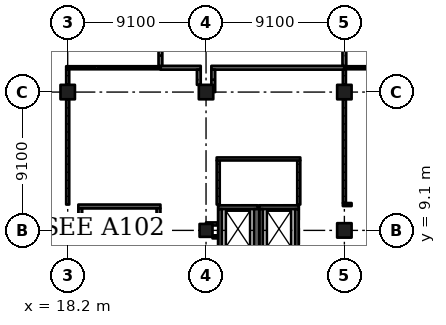
"""IFC4 building model, lengths in metres.
Left out: names, types, materials, properties, quantities, classifications, styles, units other than length and angle.
Written with IfcOpenShell. Run it as: python <this file> out.ifc"""

import sys

from ifc_helpers import new_model, si_unit, direction, frame, frame_2d, origin, origin_2d, place, context, subcontext, project, spatial, rectangle, extrude, element, fill, save


model = new_model("IFC4")
c1 = context("Model", 3, precision=1e-05, world=origin(), true_north=direction((0.0, 1.0)))
c2 = subcontext(c1, "Body", "Model", "MODEL_VIEW")
j1 = project(units=[si_unit("LENGTHUNIT", "METRE"), si_unit("PLANEANGLEUNIT", "RADIAN")], contexts=[c1])
p1 = place(None, origin())
s1 = spatial("IfcSite", under=j1, at=p1, CompositionType="ELEMENT")
p2 = place(p1, origin())
s2 = spatial("IfcBuilding", under=s1, at=p2, CompositionType="ELEMENT")
p3 = place(p2, origin())
s3 = spatial("IfcBuildingStorey", under=s2, at=p3, CompositionType="ELEMENT", Elevation=0.0)
p4 = place(p3, frame((18.2, 9.1, -0.4), z_axis=(0.0, 0.0, 1.0), x_axis=(1.0, 0.0, 0.0)))
e1 = element("IfcColumn", 1, at=p4, inside=s3, PredefinedType="COLUMN", context=c2, shape_type="SweptSolid", body=[
    extrude(rectangle(XDim=0.8, YDim=0.8, at=origin_2d()), origin(), (0.0, 0.0, 1.0), 6.77),
])
p5 = place(p3, frame((18.2, 18.2, -0.4), z_axis=(0.0, 0.0, 1.0), x_axis=(1.0, 0.0, 0.0)))
e2 = element("IfcColumn", 2, at=p5, inside=s3, PredefinedType="COLUMN", context=c2, shape_type="SweptSolid", body=[
    extrude(rectangle(XDim=0.95, YDim=0.95, at=origin_2d()), origin(), (0.0, 0.0, 1.0), 6.77),
])
p6 = place(p3, frame((27.3, 9.1, -0.4), z_axis=(0.0, 0.0, 1.0), x_axis=(1.0, 0.0, 0.0)))
e3 = element("IfcColumn", 3, at=p6, inside=s3, PredefinedType="COLUMN", context=c2, shape_type="SweptSolid", body=[
    extrude(rectangle(XDim=0.85, YDim=0.85, at=origin_2d()), origin(), (0.0, 0.0, 1.0), 6.77),
])
for number, where, z_axis, x_axis in (
    (4, (27.3, 18.2, -0.4), (0.0, 0.0, 1.0), (1.0, 0.0, 0.0)),
    (5, (36.4, 9.1, -0.4), (0.0, 0.0, 1.0), (1.0, 0.0, 0.0)),
    (6, (36.4, 18.2, -0.4), (0.0, 0.0, 1.0), (1.0, 0.0, 0.0)),
):
    element("IfcColumn", number, at=place(p3, frame(where, z_axis=z_axis, x_axis=x_axis)), inside=s3, PredefinedType="COLUMN", context=c2, shape_type="SweptSolid", body=[
        extrude(rectangle(XDim=0.95, YDim=0.95, at=origin_2d()), origin(), (0.0, 0.0, 1.0), 6.77),
    ])
p7 = place(p3, frame((30.7, 10.625, -1.4), z_axis=(0.0, 0.0, 1.0), x_axis=(-1.0, 0.0, 0.0)))
e7 = element("IfcWall", 7, at=p7, inside=s3, PredefinedType="SHEAR", context=c2, shape_type="SweptSolid", body=[
    extrude(rectangle(XDim=2.6, YDim=0.25, at=frame_2d((1.3, 0.0))), origin(), (0.0, 0.0, 1.0), 7.77),
])
p8 = place(p7, frame((0.8, 0.0, 1.4)))
e8 = element("IfcOpeningElement", 8, at=p8, cuts=e7, PredefinedType="OPENING", context=c2, shape_type="SweptSolid", body=[
    extrude(rectangle(XDim=1.0, YDim=2.1, at=frame_2d((0.5, 1.05))), frame((0.0, 0.135, 0.0), z_axis=(0.0, -1.0, 0.0), x_axis=(1.0, 0.0, 0.0)), (0.0, 0.0, 1.0), 0.27),
])
p9 = place(p3, frame((28.225, 10.5, -1.4), z_axis=(0.0, 0.0, 1.0), x_axis=(0.0, -1.0, 0.0)))
e9 = element("IfcWall", 9, at=p9, inside=s3, PredefinedType="SHEAR", context=c2, shape_type="SweptSolid", body=[
    extrude(rectangle(XDim=2.9, YDim=0.25, at=frame_2d((1.45, 0.0))), origin(), (0.0, 0.0, 1.0), 7.77),
])
p10 = place(p3, frame((30.625, 10.5, -1.4), z_axis=(0.0, 0.0, 1.0), x_axis=(0.0, -1.0, 0.0)))
e10 = element("IfcWall", 10, at=p10, inside=s3, PredefinedType="SHEAR", context=c2, shape_type="SweptSolid", body=[
    extrude(rectangle(XDim=2.9, YDim=0.35, at=frame_2d((1.45, 0.0))), origin(), (0.0, 0.0, 1.0), 7.77),
])
p11 = place(p3, frame((33.4, 10.625, -1.4), z_axis=(0.0, 0.0, 1.0), x_axis=(-1.0, 0.0, 0.0)))
e11 = element("IfcWall", 11, at=p11, inside=s3, PredefinedType="SHEAR", context=c2, shape_type="SweptSolid", body=[
    extrude(rectangle(XDim=2.6, YDim=0.25, at=frame_2d((1.3, 0.0))), origin(), (0.0, 0.0, 1.0), 7.77),
])
p12 = place(p11, frame((0.8, 0.0, 1.4)))
e12 = element("IfcOpeningElement", 12, at=p12, cuts=e11, PredefinedType="OPENING", context=c2, shape_type="SweptSolid", body=[
    extrude(rectangle(XDim=1.0, YDim=2.1, at=frame_2d((0.5, 1.05))), frame((0.0, 0.135, 0.0), z_axis=(0.0, -1.0, 0.0), x_axis=(1.0, 0.0, 0.0)), (0.0, 0.0, 1.0), 0.27),
])
for number, where, z_axis, x_axis in (
    (13, (30.925, 10.5, -1.4), (0.0, 0.0, 1.0), (0.0, -1.0, 0.0)),
    (14, (33.275, 10.5, -1.4), (0.0, 0.0, 1.0), (0.0, -1.0, 0.0)),
):
    element("IfcWall", number, at=place(p3, frame(where, z_axis=z_axis, x_axis=x_axis)), inside=s3, PredefinedType="SHEAR", context=c2, shape_type="SweptSolid", body=[
        extrude(rectangle(XDim=2.9, YDim=0.25, at=frame_2d((1.45, 0.0))), origin(), (0.0, 0.0, 1.0), 7.77),
    ])
p13 = place(p3, frame((24.3, 10.675, -0.4), z_axis=(0.0, 0.0, 1.0), x_axis=(-1.0, 0.0, 0.0)))
e15 = element("IfcWall", 15, at=p13, inside=s3, PredefinedType="SHEAR", context=c2, shape_type="SweptSolid", body=[
    extrude(rectangle(XDim=5.4, YDim=0.25, at=frame_2d((2.7, 0.0))), origin(), (0.0, 0.0, 1.0), 6.77),
])
p14 = place(p13, frame((1.5, 0.0, 0.4)))
e16 = element("IfcOpeningElement", 16, at=p14, cuts=e15, PredefinedType="OPENING", context=c2, shape_type="SweptSolid", body=[
    extrude(rectangle(XDim=2.4, YDim=2.1, at=frame_2d((1.2, 1.05))), frame((0.0, 0.135, 0.0), z_axis=(0.0, -1.0, 0.0), x_axis=(1.0, 0.0, 0.0)), (0.0, 0.0, 1.0), 0.27),
])
p15 = place(p3, frame((19.025, 10.55, -0.4), z_axis=(0.0, 0.0, 1.0), x_axis=(0.0, -1.0, 0.0)))
e17 = element("IfcWall", 17, at=p15, inside=s3, PredefinedType="SHEAR", context=c2, shape_type="SweptSolid", body=[
    extrude(rectangle(XDim=9.6, YDim=0.25, at=frame_2d((4.8, 0.0))), origin(), (0.0, 0.0, 1.0), 6.77),
])
p16 = place(p3, frame((24.175, 10.55, -0.4), z_axis=(0.0, 0.0, 1.0), x_axis=(0.0, -1.0, 0.0)))
e18 = element("IfcWall", 18, at=p16, inside=s3, PredefinedType="SHEAR", context=c2, shape_type="SweptSolid", body=[
    extrude(rectangle(XDim=9.6, YDim=0.25, at=frame_2d((4.8, 0.0))), origin(), (0.0, 0.0, 1.0), 6.77),
])
p17 = place(p16, frame((0.45, 0.0, 0.4)))
e19 = element("IfcOpeningElement", 19, at=p17, cuts=e18, PredefinedType="OPENING", context=c2, shape_type="SweptSolid", body=[
    extrude(rectangle(XDim=1.2, YDim=2.1, at=frame_2d((0.6, 1.05))), frame((0.0, 0.135, 0.0), z_axis=(0.0, -1.0, 0.0), x_axis=(1.0, 0.0, 0.0)), (0.0, 0.0, 1.0), 0.27),
])
p18 = place(p3, frame((18.1, 19.8, 0.0), z_axis=(0.0, 0.0, 1.0), x_axis=(1.0, 0.0, 0.0)))
e20 = element("IfcWall", 20, at=p18, inside=s3, PredefinedType="PARTITIONING", context=c2, shape_type="SweptSolid", body=[
    extrude(rectangle(XDim=6.2, YDim=0.2, at=frame_2d((3.1, 0.0))), origin(), (0.0, 0.0, 1.0), 6.02),
])
p19 = place(p18, frame((2.95, 0.0, 0.0)))
e21 = element("IfcOpeningElement", 21, at=p19, cuts=e20, PredefinedType="OPENING", context=c2, shape_type="SweptSolid", body=[
    extrude(rectangle(XDim=1.8, YDim=2.4, at=frame_2d((0.9, 1.2))), frame((0.0, 0.11, 0.0), z_axis=(0.0, -1.0, 0.0), x_axis=(1.0, 0.0, 0.0)), (0.0, 0.0, 1.0), 0.22),
])
p20 = place(p3, frame((18.2, 17.725, 0.0), z_axis=(0.0, 0.0, 1.0), x_axis=(0.0, -1.0, 0.0)))
e22 = element("IfcWall", 22, at=p20, inside=s3, PredefinedType="PARTITIONING", context=c2, shape_type="SweptSolid", body=[
    extrude(rectangle(XDim=6.925, YDim=0.2, at=frame_2d((3.462, 0.0))), origin(), (0.0, 0.0, 1.0), 5.32),
])
p21 = place(p20, frame((0.85, 0.0, 0.0)))
e23 = element("IfcOpeningElement", 23, at=p21, cuts=e22, PredefinedType="OPENING", context=c2, shape_type="SweptSolid", body=[
    extrude(rectangle(XDim=1.8, YDim=2.4, at=frame_2d((0.9, 1.2))), frame((0.0, 0.11, 0.0), z_axis=(0.0, -1.0, 0.0), x_axis=(1.0, 0.0, 0.0)), (0.0, 0.0, 1.0), 0.22),
])
p22 = place(p20, frame((4.25, 0.0, 0.0)))
e24 = element("IfcOpeningElement", 24, at=p22, cuts=e22, PredefinedType="OPENING", context=c2, shape_type="SweptSolid", body=[
    extrude(rectangle(XDim=1.8, YDim=2.4, at=frame_2d((0.9, 1.2))), frame((0.0, 0.11, 0.0), z_axis=(0.0, -1.0, 0.0), x_axis=(1.0, 0.0, 0.0)), (0.0, 0.0, 1.0), 0.22),
])
p23 = place(p3, frame((18.2, 19.7, 0.0), z_axis=(0.0, 0.0, 1.0), x_axis=(0.0, -1.0, 0.0)))
e25 = element("IfcWall", 25, at=p23, inside=s3, PredefinedType="PARTITIONING", context=c2, shape_type="SweptSolid", body=[
    extrude(rectangle(XDim=1.025, YDim=0.2, at=frame_2d((0.512, 0.0))), origin(), (0.0, 0.0, 1.0), 5.32),
])
p24 = place(p3, frame((24.3, 19.8, 0.0), z_axis=(0.0, 0.0, 1.0), x_axis=(1.0, 0.0, 0.0)))
e26 = element("IfcWall", 26, at=p24, inside=s3, PredefinedType="SOLIDWALL", context=c2, shape_type="SweptSolid", body=[
    extrude(rectangle(XDim=2.65, YDim=0.25, at=frame_2d((1.325, 0.0))), origin(), (0.0, 0.0, 1.0), 6.02),
])
p25 = place(p3, frame((24.3, 22.8, 0.0), z_axis=(0.0, 0.0, 1.0), x_axis=(0.0, -1.0, 0.0)))
e27 = element("IfcWall", 27, at=p25, inside=s3, PredefinedType="SOLIDWALL", context=c2, shape_type="SweptSolid", body=[
    extrude(rectangle(XDim=2.875, YDim=0.25, at=frame_2d((1.438, 0.0))), origin(), (0.0, 0.0, 1.0), 6.02),
])
p26 = place(p3, frame((26.825, 19.675, 0.0), z_axis=(0.0, 0.0, 1.0), x_axis=(0.0, -1.0, 0.0)))
e28 = element("IfcWall", 28, at=p26, inside=s3, PredefinedType="SOLIDWALL", context=c2, shape_type="SweptSolid", body=[
    extrude(rectangle(XDim=1.0, YDim=0.25, at=frame_2d((0.5, 0.0))), origin(), (0.0, 0.0, 1.0), 6.02),
])
p27 = place(p3, frame((27.3, 9.525, 0.0), z_axis=(0.0, 0.0, 1.0), x_axis=(1.0, 0.0, 0.0)))
e29 = element("IfcWall", 29, at=p27, inside=s3, PredefinedType="PARTITIONING", context=c2, shape_type="SweptSolid", body=[
    extrude(rectangle(XDim=0.77, YDim=0.2, at=frame_2d((0.385, 0.0))), origin(), (0.0, 0.0, 1.0), 6.02),
])
p28 = place(p3, frame((27.65, 19.8, 0.0), z_axis=(0.0, 0.0, 1.0), x_axis=(1.0, 0.0, 0.0)))
e30 = element("IfcWall", 30, at=p28, inside=s3, PredefinedType="SOLIDWALL", context=c2, shape_type="SweptSolid", body=[
    extrude(rectangle(XDim=8.75, YDim=0.25, at=frame_2d((4.375, 0.0))), origin(), (0.0, 0.0, 1.0), 6.02),
])
p29 = place(p28, frame((3.45, 0.0, 0.0)))
e31 = element("IfcOpeningElement", 31, at=p29, cuts=e30, PredefinedType="OPENING", context=c2, shape_type="SweptSolid", body=[
    extrude(rectangle(XDim=1.8, YDim=2.1, at=frame_2d((0.9, 1.05))), frame((0.0, 0.135, 0.0), z_axis=(0.0, -1.0, 0.0), x_axis=(1.0, 0.0, 0.0)), (0.0, 0.0, 1.0), 0.27),
])
p30 = place(p3, frame((27.725, 8.675, 0.0), z_axis=(0.0, 0.0, 1.0), x_axis=(1.0, 0.0, 0.0)))
e32 = element("IfcWall", 32, at=p30, inside=s3, PredefinedType="PARTITIONING", context=c2, shape_type="SweptSolid", body=[
    extrude(rectangle(XDim=0.345, YDim=0.2, at=frame_2d((0.172, 0.0))), origin(), (0.0, 0.0, 1.0), 6.02),
])
p31 = place(p3, frame((27.775, 18.2, 0.0), z_axis=(0.0, 0.0, 1.0), x_axis=(0.0, 1.0, 0.0)))
e33 = element("IfcWall", 33, at=p31, inside=s3, PredefinedType="SOLIDWALL", context=c2, shape_type="SweptSolid", body=[
    extrude(rectangle(XDim=1.475, YDim=0.25, at=frame_2d((0.738, 0.0))), origin(), (0.0, 0.0, 1.0), 6.02),
])
p32 = place(p3, frame((28.1, 13.7, 0.0), z_axis=(0.0, 0.0, 1.0), x_axis=(0.0, -1.0, 0.0)))
e34 = element("IfcWall", 34, at=p32, inside=s3, PredefinedType="PARTITIONING", context=c2, shape_type="SweptSolid", body=[
    extrude(rectangle(XDim=2.9, YDim=0.2, at=frame_2d((1.45, 0.0))), origin(), (0.0, 0.0, 1.0), 6.02),
])
p33 = place(p32, frame((0.55, 0.0, 0.0)))
e35 = element("IfcOpeningElement", 35, at=p33, cuts=e34, PredefinedType="OPENING", context=c2, shape_type="SweptSolid", body=[
    extrude(rectangle(XDim=1.8, YDim=2.4, at=frame_2d((0.9, 1.2))), frame((0.0, 0.11, 0.0), z_axis=(0.0, -1.0, 0.0), x_axis=(1.0, 0.0, 0.0)), (0.0, 0.0, 1.0), 0.22),
])
p34 = place(p3, frame((33.4, 10.8, 0.0), z_axis=(0.0, 0.0, 1.0), x_axis=(0.0, 1.0, 0.0)))
e36 = element("IfcWall", 36, at=p34, inside=s3, PredefinedType="PARTITIONING", context=c2, shape_type="SweptSolid", body=[
    extrude(rectangle(XDim=2.9, YDim=0.2, at=frame_2d((1.45, 0.0))), origin(), (0.0, 0.0, 1.0), 6.02),
])
p35 = place(p34, frame((0.55, 0.0, 0.0)))
e37 = element("IfcOpeningElement", 37, at=p35, cuts=e36, PredefinedType="OPENING", context=c2, shape_type="SweptSolid", body=[
    extrude(rectangle(XDim=1.8, YDim=2.4, at=frame_2d((0.9, 1.2))), frame((0.0, 0.11, 0.0), z_axis=(0.0, -1.0, 0.0), x_axis=(1.0, 0.0, 0.0)), (0.0, 0.0, 1.0), 0.22),
])
p36 = place(p3, frame((33.5, 13.8, 0.0), z_axis=(0.0, 0.0, 1.0), x_axis=(-1.0, 0.0, 0.0)))
e38 = element("IfcWall", 38, at=p36, inside=s3, PredefinedType="PARTITIONING", context=c2, shape_type="SweptSolid", body=[
    extrude(rectangle(XDim=5.5, YDim=0.2, at=frame_2d((2.75, 0.0))), origin(), (0.0, 0.0, 1.0), 6.02),
])
p37 = place(p36, frame((1.85, 0.0, 0.0)))
e39 = element("IfcOpeningElement", 39, at=p37, cuts=e38, PredefinedType="OPENING", context=c2, shape_type="SweptSolid", body=[
    extrude(rectangle(XDim=1.8, YDim=2.4, at=frame_2d((0.9, 1.2))), frame((0.0, 0.11, 0.0), z_axis=(0.0, -1.0, 0.0), x_axis=(1.0, 0.0, 0.0)), (0.0, 0.0, 1.0), 0.22),
])
p38 = place(p3, frame((36.3, 10.8, 0.0), z_axis=(0.0, 0.0, 1.0), x_axis=(1.0, 0.0, 0.0)))
e40 = element("IfcWall", 40, at=p38, inside=s3, PredefinedType="PARTITIONING", context=c2, shape_type="SweptSolid", body=[
    extrude(rectangle(XDim=0.575, YDim=0.2, at=frame_2d((0.288, 0.0))), origin(), (0.0, 0.0, 1.0), 6.02),
])
p39 = place(p3, frame((36.4, 17.725, 0.0), z_axis=(0.0, 0.0, 1.0), x_axis=(0.0, -1.0, 0.0)))
e41 = element("IfcWall", 41, at=p39, inside=s3, PredefinedType="PARTITIONING", context=c2, shape_type="SweptSolid", body=[
    extrude(rectangle(XDim=6.825, YDim=0.2, at=frame_2d((3.413, 0.0))), origin(), (0.0, 0.0, 1.0), 5.32),
])
p40 = place(p39, frame((0.85, 0.0, 0.0)))
e42 = element("IfcOpeningElement", 42, at=p40, cuts=e41, PredefinedType="OPENING", context=c2, shape_type="SweptSolid", body=[
    extrude(rectangle(XDim=1.8, YDim=2.4, at=frame_2d((0.9, 1.2))), frame((0.0, 0.11, 0.0), z_axis=(0.0, -1.0, 0.0), x_axis=(1.0, 0.0, 0.0)), (0.0, 0.0, 1.0), 0.22),
])
p41 = place(p39, frame((4.25, 0.0, 0.0)))
e43 = element("IfcOpeningElement", 43, at=p41, cuts=e41, PredefinedType="OPENING", context=c2, shape_type="SweptSolid", body=[
    extrude(rectangle(XDim=1.8, YDim=2.4, at=frame_2d((0.9, 1.2))), frame((0.0, 0.11, 0.0), z_axis=(0.0, -1.0, 0.0), x_axis=(1.0, 0.0, 0.0)), (0.0, 0.0, 1.0), 0.22),
])
p42 = place(p3, frame((36.4, 19.675, 0.0), z_axis=(0.0, 0.0, 1.0), x_axis=(0.0, -1.0, 0.0)))
e44 = element("IfcWall", 44, at=p42, inside=s3, PredefinedType="PARTITIONING", context=c2, shape_type="SweptSolid", body=[
    extrude(rectangle(XDim=1.0, YDim=0.2, at=frame_2d((0.5, 0.0))), origin(), (0.0, 0.0, 1.0), 5.32),
])
p43 = place(p3, frame((36.4, 19.8, 0.0), z_axis=(0.0, 0.0, 1.0), x_axis=(1.0, 0.0, 0.0)))
e45 = element("IfcWall", 45, at=p43, inside=s3, PredefinedType="PARTITIONING", context=c2, shape_type="SweptSolid", body=[
    extrude(rectangle(XDim=4.15, YDim=0.2, at=frame_2d((2.075, 0.0))), origin(), (0.0, 0.0, 1.0), 6.02),
])
p44 = place(p43, frame((1.15, 0.0, 0.0)))
e46 = element("IfcOpeningElement", 46, at=p44, cuts=e45, PredefinedType="OPENING", context=c2, shape_type="SweptSolid", body=[
    extrude(rectangle(XDim=1.8, YDim=2.4, at=frame_2d((0.9, 1.2))), frame((0.0, 0.11, 0.0), z_axis=(0.0, -1.0, 0.0), x_axis=(1.0, 0.0, 0.0)), (0.0, 0.0, 1.0), 0.22),
])
p45 = place(p3, frame((36.4, 26.85, 0.0), z_axis=(0.0, 0.0, 1.0), x_axis=(0.0, -1.0, 0.0)))
e47 = element("IfcWall", 47, at=p45, inside=s3, PredefinedType="SOLIDWALL", context=c2, shape_type="SweptSolid", body=[
    extrude(rectangle(XDim=6.925, YDim=0.25, at=frame_2d((3.462, 0.0))), origin(), (0.0, 0.0, 1.0), 5.32),
])
p46 = place(p29, origin())
e48 = element("IfcDoor", 48, at=p46, inside=s3, OperationType="DOUBLE_DOOR_SINGLE_SWING", PredefinedType="DOOR", context=c2, shape_type="SweptSolid", body=[
    extrude(rectangle(XDim=1.8, YDim=2.1, at=frame_2d((0.9, 1.05))), frame((0.0, 0.025, 0.0), z_axis=(0.0, -1.0, 0.0), x_axis=(1.0, 0.0, 0.0)), (0.0, 0.0, 1.0), 0.05),
])
fill(e31, e48)
p47 = place(p21, origin())
e49 = element("IfcDoor", 49, at=p47, inside=s3, OperationType="DOUBLE_DOOR_SINGLE_SWING", PredefinedType="DOOR", context=c2, shape_type="SweptSolid", body=[
    extrude(rectangle(XDim=1.8, YDim=2.4, at=frame_2d((0.9, 1.2))), frame((0.0, 0.025, 0.0), z_axis=(0.0, -1.0, 0.0), x_axis=(1.0, 0.0, 0.0)), (0.0, 0.0, 1.0), 0.05),
])
fill(e23, e49)
p48 = place(p22, origin())
e50 = element("IfcDoor", 50, at=p48, inside=s3, OperationType="DOUBLE_DOOR_SINGLE_SWING", PredefinedType="DOOR", context=c2, shape_type="SweptSolid", body=[
    extrude(rectangle(XDim=1.8, YDim=2.4, at=frame_2d((0.9, 1.2))), frame((0.0, 0.025, 0.0), z_axis=(0.0, -1.0, 0.0), x_axis=(1.0, 0.0, 0.0)), (0.0, 0.0, 1.0), 0.05),
])
fill(e24, e50)
p49 = place(p40, origin())
e51 = element("IfcDoor", 51, at=p49, inside=s3, OperationType="DOUBLE_DOOR_SINGLE_SWING", PredefinedType="DOOR", context=c2, shape_type="SweptSolid", body=[
    extrude(rectangle(XDim=1.8, YDim=2.4, at=frame_2d((0.9, 1.2))), frame((0.0, 0.025, 0.0), z_axis=(0.0, -1.0, 0.0), x_axis=(1.0, 0.0, 0.0)), (0.0, 0.0, 1.0), 0.05),
])
fill(e42, e51)
p50 = place(p41, origin())
e52 = element("IfcDoor", 52, at=p50, inside=s3, OperationType="DOUBLE_DOOR_SINGLE_SWING", PredefinedType="DOOR", context=c2, shape_type="SweptSolid", body=[
    extrude(rectangle(XDim=1.8, YDim=2.4, at=frame_2d((0.9, 1.2))), frame((0.0, 0.025, 0.0), z_axis=(0.0, -1.0, 0.0), x_axis=(1.0, 0.0, 0.0)), (0.0, 0.0, 1.0), 0.05),
])
fill(e43, e52)
p51 = place(p37, origin())
e53 = element("IfcDoor", 53, at=p51, inside=s3, OperationType="DOUBLE_DOOR_SINGLE_SWING", PredefinedType="DOOR", context=c2, shape_type="SweptSolid", body=[
    extrude(rectangle(XDim=1.8, YDim=2.4, at=frame_2d((0.9, 1.2))), frame((0.0, 0.025, 0.0), z_axis=(0.0, -1.0, 0.0), x_axis=(1.0, 0.0, 0.0)), (0.0, 0.0, 1.0), 0.05),
])
fill(e39, e53)
p52 = place(p33, origin())
e54 = element("IfcDoor", 54, at=p52, inside=s3, OperationType="DOUBLE_DOOR_SINGLE_SWING", PredefinedType="DOOR", context=c2, shape_type="SweptSolid", body=[
    extrude(rectangle(XDim=1.8, YDim=2.4, at=frame_2d((0.9, 1.2))), frame((0.0, 0.025, 0.0), z_axis=(0.0, -1.0, 0.0), x_axis=(1.0, 0.0, 0.0)), (0.0, 0.0, 1.0), 0.05),
])
fill(e35, e54)
p53 = place(p35, origin())
e55 = element("IfcDoor", 55, at=p53, inside=s3, OperationType="DOUBLE_DOOR_SINGLE_SWING", PredefinedType="DOOR", context=c2, shape_type="SweptSolid", body=[
    extrude(rectangle(XDim=1.8, YDim=2.4, at=frame_2d((0.9, 1.2))), frame((0.0, 0.025, 0.0), z_axis=(0.0, -1.0, 0.0), x_axis=(1.0, 0.0, 0.0)), (0.0, 0.0, 1.0), 0.05),
])
fill(e37, e55)
p54 = place(p19, origin())
e56 = element("IfcDoor", 56, at=p54, inside=s3, OperationType="DOUBLE_DOOR_SINGLE_SWING", PredefinedType="DOOR", context=c2, shape_type="SweptSolid", body=[
    extrude(rectangle(XDim=1.8, YDim=2.4, at=frame_2d((0.9, 1.2))), frame((0.0, 0.025, 0.0), z_axis=(0.0, -1.0, 0.0), x_axis=(1.0, 0.0, 0.0)), (0.0, 0.0, 1.0), 0.05),
])
fill(e21, e56)
p55 = place(p44, origin())
e57 = element("IfcDoor", 57, at=p55, inside=s3, OperationType="DOUBLE_DOOR_SINGLE_SWING", PredefinedType="DOOR", context=c2, shape_type="SweptSolid", body=[
    extrude(rectangle(XDim=1.8, YDim=2.4, at=frame_2d((0.9, 1.2))), frame((0.0, 0.025, 0.0), z_axis=(0.0, -1.0, 0.0), x_axis=(1.0, 0.0, 0.0)), (0.0, 0.0, 1.0), 0.05),
])
fill(e46, e57)
p56 = place(p14, origin())
e58 = element("IfcDoor", 58, at=p56, inside=s3, OperationType="DOUBLE_DOOR_SINGLE_SWING", PredefinedType="DOOR", context=c2, shape_type="SweptSolid", body=[
    extrude(rectangle(XDim=2.4, YDim=2.1, at=frame_2d((1.2, 1.05))), frame((0.0, 0.025, 0.0), z_axis=(0.0, -1.0, 0.0), x_axis=(1.0, 0.0, 0.0)), (0.0, 0.0, 1.0), 0.05),
])
fill(e16, e58)
p57 = place(p17, origin())
e59 = element("IfcDoor", 59, at=p57, inside=s3, OperationType="SINGLE_SWING_RIGHT", PredefinedType="DOOR", context=c2, shape_type="SweptSolid", body=[
    extrude(rectangle(XDim=1.2, YDim=2.1, at=frame_2d((0.6, 1.05))), frame((0.0, 0.025, 0.0), z_axis=(0.0, -1.0, 0.0), x_axis=(1.0, 0.0, 0.0)), (0.0, 0.0, 1.0), 0.05),
])
fill(e19, e59)
p58 = place(p8, origin())
e60 = element("IfcDoor", 60, at=p58, inside=s3, OperationType="DOUBLE_DOOR_SLIDING", PredefinedType="DOOR", context=c2, shape_type="SweptSolid", body=[
    extrude(rectangle(XDim=1.0, YDim=2.1, at=frame_2d((0.5, 1.05))), frame((0.0, 0.025, 0.0), z_axis=(0.0, -1.0, 0.0), x_axis=(1.0, 0.0, 0.0)), (0.0, 0.0, 1.0), 0.05),
])
fill(e8, e60)
p59 = place(p12, origin())
e61 = element("IfcDoor", 61, at=p59, inside=s3, OperationType="DOUBLE_DOOR_SLIDING", PredefinedType="DOOR", context=c2, shape_type="SweptSolid", body=[
    extrude(rectangle(XDim=1.0, YDim=2.1, at=frame_2d((0.5, 1.05))), frame((0.0, 0.025, 0.0), z_axis=(0.0, -1.0, 0.0), x_axis=(1.0, 0.0, 0.0)), (0.0, 0.0, 1.0), 0.05),
])
fill(e12, e61)
save(model, sys.argv[1])
